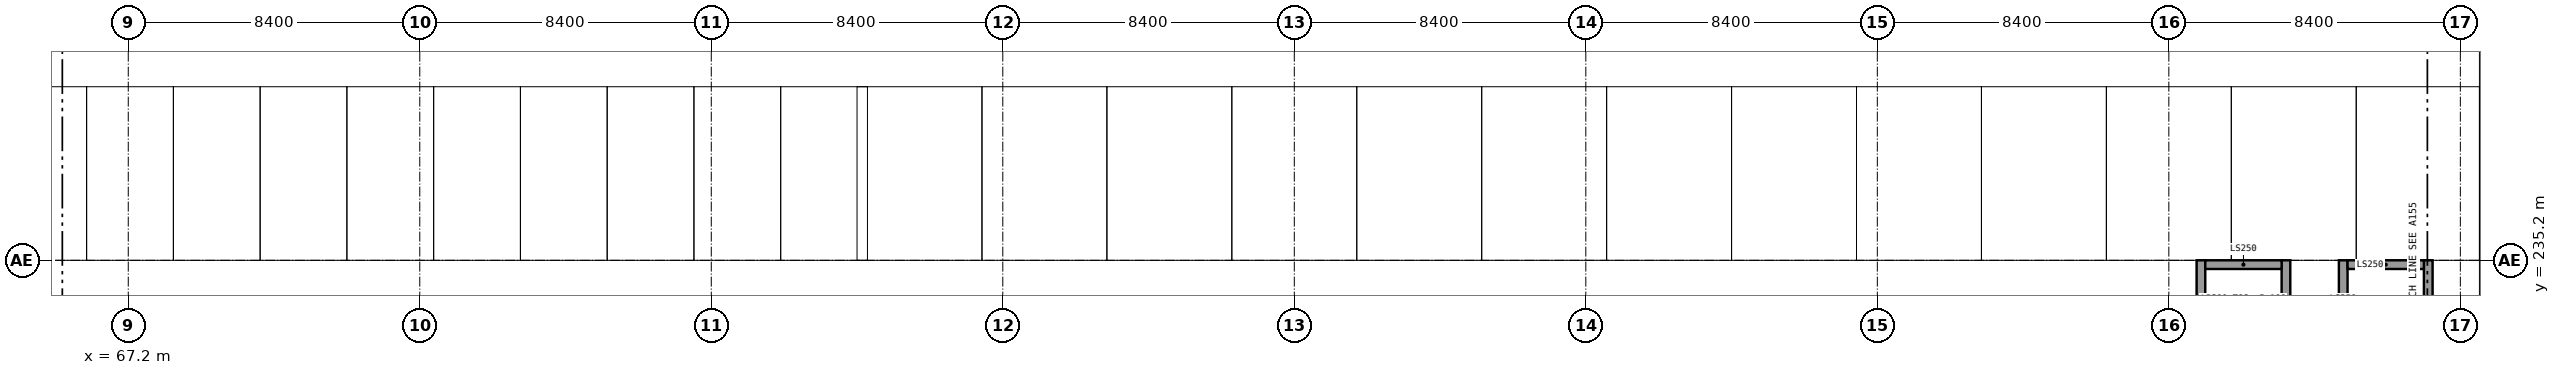
"""IFC4 building model, lengths in metres.
Left out: names, types, materials, properties, quantities, classifications, styles, units other than length and angle.
Written with IfcOpenShell. Run it as: python <this file> out.ifc"""

import sys

from ifc_helpers import new_model, si_unit, direction, frame, frame_2d, origin, place, context, subcontext, project, spatial, rectangle, extrude, element, save


model = new_model("IFC4")
c1 = context("Model", 3, precision=1e-05, world=origin(), true_north=direction((0.0, 1.0)))
c2 = subcontext(c1, "Body", "Model", "MODEL_VIEW")
j1 = project(units=[si_unit("LENGTHUNIT", "METRE"), si_unit("PLANEANGLEUNIT", "RADIAN")], contexts=[c1])
p1 = place(None, origin())
s1 = spatial("IfcSite", under=j1, at=p1, CompositionType="ELEMENT")
p2 = place(p1, origin())
s2 = spatial("IfcBuilding", under=s1, at=p2, CompositionType="ELEMENT")
p3 = place(p2, origin())
s3 = spatial("IfcBuildingStorey", under=s2, at=p3, CompositionType="ELEMENT", Elevation=0.0)
for number, where, z_axis, x_axis in (
    (1, (126.925, 232.1, 0.0), (0.0, 0.0, 1.0), (0.0, 1.0, 0.0)),
    (2, (129.375, 232.1, 0.0), (0.0, 0.0, 1.0), (0.0, 1.0, 0.0)),
):
    element("IfcWall", number, at=place(p3, frame(where, z_axis=z_axis, x_axis=x_axis)), inside=s3, PredefinedType="SHEAR", context=c2, shape_type="SweptSolid", body=[
        extrude(rectangle(XDim=3.1, YDim=0.25, at=frame_2d((1.55, 0.0))), origin(), (0.0, 0.0, 1.0), 4.8),
    ])
p4 = place(p3, frame((127.05, 235.075, 0.0), z_axis=(0.0, 0.0, 1.0), x_axis=(1.0, 0.0, 0.0)))
e3 = element("IfcWall", 3, at=p4, inside=s3, PredefinedType="SHEAR", context=c2, shape_type="SweptSolid", body=[
    extrude(rectangle(XDim=2.2, YDim=0.25, at=frame_2d((1.1, 0.0))), origin(), (0.0, 0.0, 1.0), 4.8),
])
for number, where, z_axis, x_axis in (
    (4, (131.025, 232.1, 0.0), (0.0, 0.0, 1.0), (0.0, 1.0, 0.0)),
    (5, (133.475, 232.1, 0.0), (0.0, 0.0, 1.0), (0.0, 1.0, 0.0)),
):
    element("IfcWall", number, at=place(p3, frame(where, z_axis=z_axis, x_axis=x_axis)), inside=s3, PredefinedType="SHEAR", context=c2, shape_type="SweptSolid", body=[
        extrude(rectangle(XDim=3.1, YDim=0.25, at=frame_2d((1.55, 0.0))), origin(), (0.0, 0.0, 1.0), 4.8),
    ])
p5 = place(p3, frame((131.15, 235.075, 0.0), z_axis=(0.0, 0.0, 1.0), x_axis=(1.0, 0.0, 0.0)))
e6 = element("IfcWall", 6, at=p5, inside=s3, PredefinedType="SHEAR", context=c2, shape_type="SweptSolid", body=[
    extrude(rectangle(XDim=2.2, YDim=0.25, at=frame_2d((1.1, 0.0))), origin(), (0.0, 0.0, 1.0), 4.8),
])
save(model, sys.argv[1])
